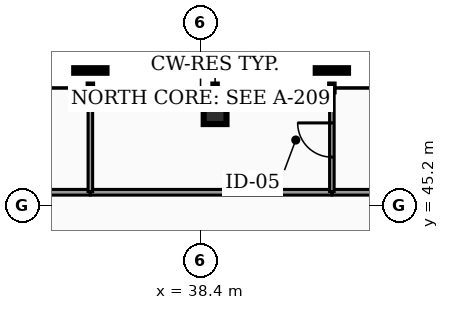
"""IFC4 building model, lengths in metres.
Left out: names, types, materials, properties, quantities, classifications, styles, units other than length and angle.
Written with IfcOpenShell. Run it as: python <this file> out.ifc"""

import sys

from ifc_helpers import new_model, si_unit, direction, frame, frame_2d, origin, origin_2d, place, context, subcontext, project, spatial, rectangle, hollow_rectangle, extrude, element, fill, save


model = new_model("IFC4")
c1 = context("Model", 3, precision=1e-05, world=origin(), true_north=direction((0.0, 1.0)))
c2 = subcontext(c1, "Body", "Model", "MODEL_VIEW")
j1 = project(units=[si_unit("LENGTHUNIT", "METRE"), si_unit("PLANEANGLEUNIT", "RADIAN")], contexts=[c1])
p1 = place(None, origin())
s1 = spatial("IfcSite", under=j1, at=p1, CompositionType="ELEMENT")
p2 = place(p1, origin())
s2 = spatial("IfcBuilding", under=s1, at=p2, CompositionType="ELEMENT")
p3 = place(p2, frame((0.0, 0.0, 225.76)))
s3 = spatial("IfcBuildingStorey", under=s2, at=p3, CompositionType="ELEMENT", Elevation=225.76)
p4 = place(p3, frame((38.782, 47.644, 0.0), z_axis=(-0.005984364795, -0.036596692403, 0.999312198206), x_axis=(0.986892561917, -0.161378657924, 0.0)))
e1 = element("IfcColumn", 1, at=p4, inside=s3, PredefinedType="COLUMN", context=c2, shape_type="SweptSolid", body=[
    extrude(hollow_rectangle(XDim=0.6, YDim=0.6, WallThickness=0.03, at=origin_2d()), origin(), (0.0, 0.0, 1.0), 3.182),
])
p5 = place(p3, frame((28.55, 45.55, 0.0), z_axis=(0.0, 0.0, 1.0), x_axis=(1.0, 0.0, 0.0)))
e2 = element("IfcWall", 2, at=p5, inside=s3, PredefinedType="PARTITIONING", context=c2, shape_type="SweptSolid", body=[
    extrude(rectangle(XDim=6.945, YDim=0.15, at=frame_2d((3.473, 0.0))), origin(), (0.0, 0.0, 1.0), 2.235),
])
p6 = place(p3, frame((41.86, 45.55, 0.0), z_axis=(0.0, 0.0, 1.0), x_axis=(1.0, 0.0, 0.0)))
e3 = element("IfcWall", 3, at=p6, inside=s3, PredefinedType="PARTITIONING", context=c2, shape_type="SweptSolid", body=[
    extrude(rectangle(XDim=6.49, YDim=0.15, at=frame_2d((3.245, 0.0))), origin(), (0.0, 0.0, 1.0), 2.235),
])
p7 = place(p3, frame((35.505, 45.55, 0.0), z_axis=(0.0, 0.0, 1.0), x_axis=(1.0, 0.0, 0.0)))
e4 = element("IfcWall", 4, at=p7, inside=s3, PredefinedType="PARTITIONING", context=c2, shape_type="SweptSolid", body=[
    extrude(rectangle(XDim=6.345, YDim=0.15, at=frame_2d((3.173, 0.0))), origin(), (0.0, 0.0, 1.0), 2.235),
])
p8 = place(p3, frame((35.5, 45.57, 0.0), z_axis=(0.0, 0.0, 1.0), x_axis=(0.0, 1.0, 0.0)))
e5 = element("IfcWall", 5, at=p8, inside=s3, PredefinedType="PARTITIONING", context=c2, shape_type="SweptSolid", body=[
    extrude(rectangle(XDim=2.709, YDim=0.12, at=frame_2d((1.354, 0.0))), origin(), (0.0, 0.0, 1.0), 2.235),
])
p9 = place(p3, frame((41.855, 45.57, 0.0), z_axis=(0.0, 0.0, 1.0), x_axis=(0.0, 1.0, 0.0)))
e6 = element("IfcWall", 6, at=p9, inside=s3, PredefinedType="PARTITIONING", context=c2, shape_type="SweptSolid", body=[
    extrude(rectangle(XDim=2.709, YDim=0.12, at=frame_2d((1.354, 0.0))), origin(), (0.0, 0.0, 1.0), 2.235),
])
p10 = place(p9, frame((0.905, 0.0, 0.0)))
e7 = element("IfcOpeningElement", 7, at=p10, cuts=e6, PredefinedType="OPENING", context=c2, shape_type="SweptSolid", body=[
    extrude(rectangle(XDim=0.9, YDim=2.05, at=frame_2d((0.45, 1.025))), frame((0.0, 0.07, 0.0), z_axis=(0.0, -1.0, 0.0), x_axis=(1.0, 0.0, 0.0)), (0.0, 0.0, 1.0), 0.14),
])
p11 = place(p10, origin())
e8 = element("IfcDoor", 8, at=p11, inside=s3, OperationType="SINGLE_SWING_RIGHT", PredefinedType="DOOR", context=c2, shape_type="SweptSolid", body=[
    extrude(rectangle(XDim=0.9, YDim=2.05, at=frame_2d((0.45, 1.025))), frame((0.0, 0.025, 0.0), z_axis=(0.0, -1.0, 0.0), x_axis=(1.0, 0.0, 0.0)), (0.0, 0.0, 1.0), 0.05),
])
fill(e7, e8)
save(model, sys.argv[1])
